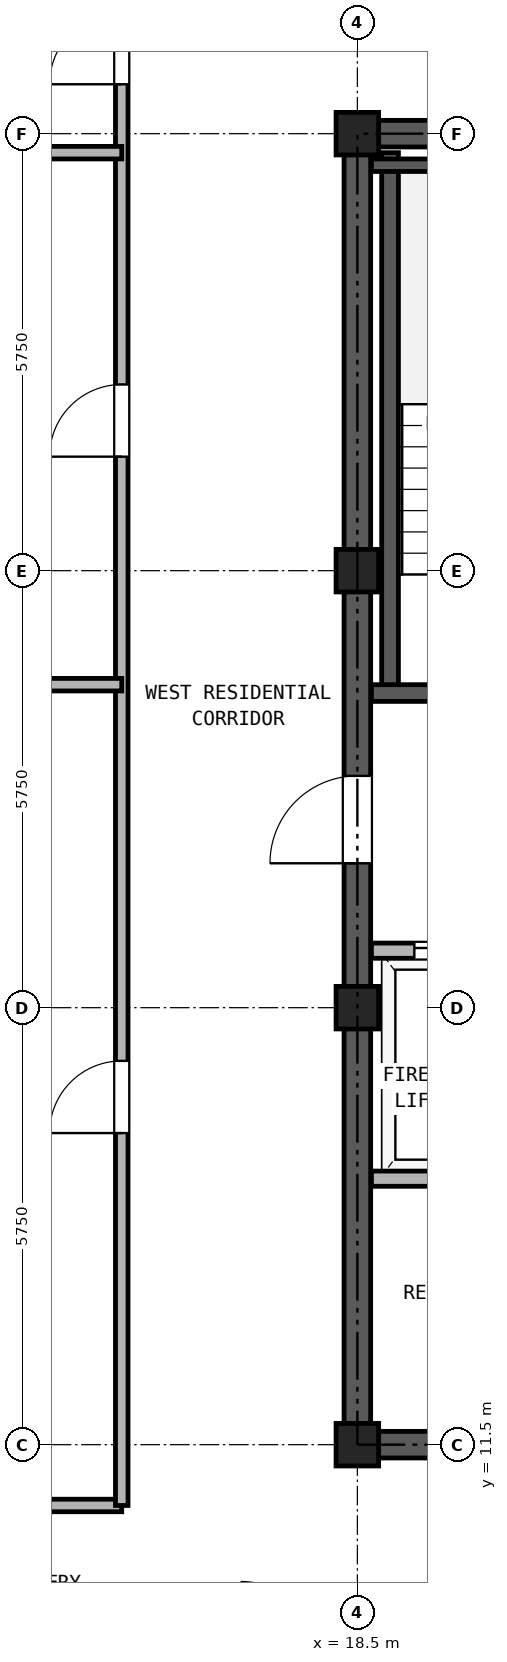
"""IFC4 building model, lengths in metres.
Left out: names, types, materials, properties, quantities, classifications, styles, units other than length and angle.
Written with IfcOpenShell. Run it as: python <this file> out.ifc"""

import sys

from ifc_helpers import new_model, si_unit, direction, frame, frame_2d, origin, origin_2d, place, context, subcontext, project, spatial, rectangle, hollow_rectangle, extrude, source, transform, mapped, element, fill, save


model = new_model("IFC4")
c1 = context("Model", 3, precision=1e-05, world=origin(), true_north=direction((0.0, 1.0)))
c2 = subcontext(c1, "Body", "Model", "MODEL_VIEW")
j1 = project(units=[si_unit("LENGTHUNIT", "METRE"), si_unit("PLANEANGLEUNIT", "RADIAN")], contexts=[c1])
p1 = place(None, origin())
s1 = spatial("IfcSite", under=j1, at=p1, CompositionType="ELEMENT")
p2 = place(p1, origin())
s2 = spatial("IfcBuilding", under=s1, at=p2, CompositionType="ELEMENT")
p3 = place(p2, frame((0.0, 0.0, 239.3)))
s3 = spatial("IfcBuildingStorey", under=s2, at=p3, CompositionType="ELEMENT", Elevation=239.3)
m1 = source(origin(), c2, "Body", "SweptSolid", [
    extrude(hollow_rectangle(XDim=0.56, YDim=0.56, WallThickness=0.03, at=origin_2d()), origin(), (0.0, 0.0, 1.0), 2.98),
])
for number, where, z_axis, x_axis in (
    (1, (18.5, 11.5, 0.0), (0.0, 0.0, 1.0), (1.0, 0.0, 0.0)),
    (2, (18.5, 17.25, 0.0), (0.0, 0.0, 1.0), (1.0, 0.0, 0.0)),
    (3, (18.5, 23.0, 0.0), (0.0, 0.0, 1.0), (1.0, 0.0, 0.0)),
    (4, (18.5, 28.75, 0.0), (0.0, 0.0, 1.0), (1.0, 0.0, 0.0)),
):
    element("IfcColumn", number, at=place(p3, frame(where, z_axis=z_axis, x_axis=x_axis)), inside=s3, PredefinedType="COLUMN", context=c2, shape_type="MappedRepresentation", body=[
        mapped(m1, transform((0.0, 0.0, 0.0), x_axis=(1.0, 0.0, 0.0), y_axis=(0.0, 1.0, 0.0), z_axis=(0.0, 0.0, 1.0), scale=1.0)),
    ])
p4 = place(p3, frame((18.325, 11.5, 0.0), z_axis=(0.0, 0.0, 1.0), x_axis=(1.0, 0.0, 0.0)))
e5 = element("IfcWall", 5, at=p4, inside=s3, PredefinedType="SHEAR", context=c2, shape_type="SweptSolid", body=[
    extrude(rectangle(XDim=10.35, YDim=0.35, at=frame_2d((5.175, 0.0))), origin(), (0.0, 0.0, 1.0), 2.98),
])
p5 = place(p4, frame((1.775, 0.0, 0.0)))
e6 = element("IfcOpeningElement", 6, at=p5, cuts=e5, PredefinedType="OPENING", context=c2, shape_type="SweptSolid", body=[
    extrude(rectangle(XDim=0.95, YDim=2.15, at=frame_2d((0.475, 1.075))), frame((0.0, 0.185, 0.0), z_axis=(0.0, -1.0, 0.0), x_axis=(1.0, 0.0, 0.0)), (0.0, 0.0, 1.0), 0.37),
])
p6 = place(p4, frame((5.275, 0.0, 0.0)))
e7 = element("IfcOpeningElement", 7, at=p6, cuts=e5, PredefinedType="OPENING", context=c2, shape_type="SweptSolid", body=[
    extrude(rectangle(XDim=0.95, YDim=2.15, at=frame_2d((0.475, 1.075))), frame((0.0, 0.185, 0.0), z_axis=(0.0, -1.0, 0.0), x_axis=(1.0, 0.0, 0.0)), (0.0, 0.0, 1.0), 0.37),
])
p7 = place(p4, frame((8.175, 0.0, 0.0)))
e8 = element("IfcOpeningElement", 8, at=p7, cuts=e5, PredefinedType="OPENING", context=c2, shape_type="SweptSolid", body=[
    extrude(rectangle(XDim=1.1, YDim=2.25, at=frame_2d((0.55, 1.125))), frame((0.0, 0.185, 0.0), z_axis=(0.0, -1.0, 0.0), x_axis=(1.0, 0.0, 0.0)), (0.0, 0.0, 1.0), 0.37),
])
p8 = place(p3, frame((18.325, 28.75, 0.0), z_axis=(0.0, 0.0, 1.0), x_axis=(1.0, 0.0, 0.0)))
e9 = element("IfcWall", 9, at=p8, inside=s3, PredefinedType="SHEAR", context=c2, shape_type="SweptSolid", body=[
    extrude(rectangle(XDim=10.35, YDim=0.35, at=frame_2d((5.175, 0.0))), origin(), (0.0, 0.0, 1.0), 2.98),
])
p9 = place(p8, frame((4.055, 0.0, 0.0)))
e10 = element("IfcOpeningElement", 10, at=p9, cuts=e9, PredefinedType="OPENING", context=c2, shape_type="SweptSolid", body=[
    extrude(rectangle(XDim=0.9, YDim=2.05, at=frame_2d((0.45, 1.025))), frame((0.0, 0.185, 0.0), z_axis=(0.0, -1.0, 0.0), x_axis=(1.0, 0.0, 0.0)), (0.0, 0.0, 1.0), 0.37),
])
p10 = place(p8, frame((5.595, 0.0, 0.0)))
e11 = element("IfcOpeningElement", 11, at=p10, cuts=e9, PredefinedType="OPENING", context=c2, shape_type="SweptSolid", body=[
    extrude(rectangle(XDim=0.9, YDim=2.05, at=frame_2d((0.45, 1.025))), frame((0.0, 0.185, 0.0), z_axis=(0.0, -1.0, 0.0), x_axis=(1.0, 0.0, 0.0)), (0.0, 0.0, 1.0), 0.37),
])
p11 = place(p3, frame((18.5, 11.675, 0.0), z_axis=(0.0, 0.0, 1.0), x_axis=(0.0, 1.0, 0.0)))
e12 = element("IfcWall", 12, at=p11, inside=s3, PredefinedType="SHEAR", context=c2, shape_type="SweptSolid", body=[
    extrude(rectangle(XDim=16.9, YDim=0.35, at=frame_2d((8.45, 0.0))), origin(), (0.0, 0.0, 1.0), 2.98),
])
p12 = place(p11, frame((7.475, 0.0, 0.0)))
e13 = element("IfcOpeningElement", 13, at=p12, cuts=e12, PredefinedType="OPENING", context=c2, shape_type="SweptSolid", body=[
    extrude(rectangle(XDim=1.15, YDim=2.2, at=frame_2d((0.575, 1.1))), frame((0.0, 0.185, 0.0), z_axis=(0.0, -1.0, 0.0), x_axis=(1.0, 0.0, 0.0)), (0.0, 0.0, 1.0), 0.37),
])
p13 = place(p3, frame((18.93, 21.39, 0.0), z_axis=(0.0, 0.0, 1.0), x_axis=(0.0, 1.0, 0.0)))
e14 = element("IfcWall", 14, at=p13, inside=s3, PredefinedType="SOLIDWALL", context=c2, shape_type="SweptSolid", body=[
    extrude(rectangle(XDim=7.11, YDim=0.22, at=frame_2d((3.555, 0.0))), origin(), (0.0, 0.0, 1.0), 2.98),
])
p14 = place(p3, frame((18.685, 28.335, 0.0), z_axis=(0.0, 0.0, 1.0), x_axis=(1.0, 0.0, 0.0)))
e15 = element("IfcWall", 15, at=p14, inside=s3, PredefinedType="PARTITIONING", context=c2, shape_type="SweptSolid", body=[
    extrude(rectangle(XDim=3.425, YDim=0.165, at=frame_2d((1.712, 0.0))), origin(), (0.0, 0.0, 1.0), 2.98),
])
p15 = place(p3, frame((18.685, 21.39, 0.0), z_axis=(0.0, 0.0, 1.0), x_axis=(1.0, 0.0, 0.0)))
e16 = element("IfcWall", 16, at=p15, inside=s3, PredefinedType="SOLIDWALL", context=c2, shape_type="SweptSolid", body=[
    extrude(rectangle(XDim=6.445, YDim=0.22, at=frame_2d((3.222, 0.0))), origin(), (0.0, 0.0, 1.0), 2.98),
])
p16 = place(p15, frame((1.165, 0.0, 0.0)))
e17 = element("IfcOpeningElement", 17, at=p16, cuts=e16, PredefinedType="OPENING", context=c2, shape_type="SweptSolid", body=[
    extrude(rectangle(XDim=1.15, YDim=2.2, at=frame_2d((0.575, 1.1))), frame((0.0, 0.12, 0.0), z_axis=(0.0, -1.0, 0.0), x_axis=(1.0, 0.0, 0.0)), (0.0, 0.0, 1.0), 0.24),
])
p17 = place(p15, frame((4.895, 0.0, 0.0)))
e18 = element("IfcOpeningElement", 18, at=p17, cuts=e16, PredefinedType="OPENING", context=c2, shape_type="SweptSolid", body=[
    extrude(rectangle(XDim=1.1, YDim=2.25, at=frame_2d((0.55, 1.125))), frame((0.0, 0.12, 0.0), z_axis=(0.0, -1.0, 0.0), x_axis=(1.0, 0.0, 0.0)), (0.0, 0.0, 1.0), 0.24),
])
p18 = place(p3, frame((18.685, 18.0, 0.0), z_axis=(0.0, 0.0, 1.0), x_axis=(1.0, 0.0, 0.0)))
e19 = element("IfcWall", 19, at=p18, inside=s3, PredefinedType="PARTITIONING", context=c2, shape_type="SweptSolid", body=[
    extrude(rectangle(XDim=9.63, YDim=0.2, at=frame_2d((4.815, 0.0))), origin(), (0.0, 0.0, 1.0), 2.98),
])
p19 = place(p18, frame((0.565, 0.0, 0.0)))
e20 = element("IfcOpeningElement", 20, at=p19, cuts=e19, PredefinedType="OPENING", context=c2, shape_type="SweptSolid", body=[
    extrude(rectangle(XDim=1.3, YDim=2.3, at=frame_2d((0.65, 1.15))), frame((0.0, 0.11, 0.0), z_axis=(0.0, -1.0, 0.0), x_axis=(1.0, 0.0, 0.0)), (0.0, 0.0, 1.0), 0.22),
])
p20 = place(p18, frame((2.665, 0.0, 0.0)))
e21 = element("IfcOpeningElement", 21, at=p20, cuts=e19, PredefinedType="OPENING", context=c2, shape_type="SweptSolid", body=[
    extrude(rectangle(XDim=1.3, YDim=2.3, at=frame_2d((0.65, 1.15))), frame((0.0, 0.11, 0.0), z_axis=(0.0, -1.0, 0.0), x_axis=(1.0, 0.0, 0.0)), (0.0, 0.0, 1.0), 0.22),
])
p21 = place(p18, frame((5.065, 0.0, 0.0)))
e22 = element("IfcOpeningElement", 22, at=p21, cuts=e19, PredefinedType="OPENING", context=c2, shape_type="SweptSolid", body=[
    extrude(rectangle(XDim=0.9, YDim=2.05, at=frame_2d((0.45, 1.025))), frame((0.0, 0.11, 0.0), z_axis=(0.0, -1.0, 0.0), x_axis=(1.0, 0.0, 0.0)), (0.0, 0.0, 1.0), 0.22),
])
p22 = place(p18, frame((7.765, 0.0, 0.0)))
e23 = element("IfcOpeningElement", 23, at=p22, cuts=e19, PredefinedType="OPENING", context=c2, shape_type="SweptSolid", body=[
    extrude(rectangle(XDim=0.9, YDim=2.05, at=frame_2d((0.45, 1.025))), frame((0.0, 0.11, 0.0), z_axis=(0.0, -1.0, 0.0), x_axis=(1.0, 0.0, 0.0)), (0.0, 0.0, 1.0), 0.22),
])
p23 = place(p3, frame((18.685, 15.0, 0.0), z_axis=(0.0, 0.0, 1.0), x_axis=(1.0, 0.0, 0.0)))
e24 = element("IfcWall", 24, at=p23, inside=s3, PredefinedType="PARTITIONING", context=c2, shape_type="SweptSolid", body=[
    extrude(rectangle(XDim=9.63, YDim=0.2, at=frame_2d((4.815, 0.0))), origin(), (0.0, 0.0, 1.0), 2.98),
])
p24 = place(p3, frame((8.56, 10.7, 0.0), z_axis=(0.0, 0.0, 1.0), x_axis=(1.0, 0.0, 0.0)))
e25 = element("IfcWall", 25, at=p24, inside=s3, PredefinedType="PARTITIONING", context=c2, shape_type="SweptSolid", body=[
    extrude(rectangle(XDim=6.84, YDim=0.165, at=frame_2d((3.42, 0.0))), origin(), (0.0, 0.0, 1.0), 2.98),
])
p25 = place(p3, frame((15.4, 10.7, 0.0), z_axis=(0.0, 0.0, 1.0), x_axis=(0.0, 1.0, 0.0)))
e26 = element("IfcWall", 26, at=p25, inside=s3, PredefinedType="PARTITIONING", context=c2, shape_type="SweptSolid", body=[
    extrude(rectangle(XDim=24.44, YDim=0.165, at=frame_2d((12.22, 0.0))), origin(), (0.0, 0.0, 1.0), 2.98),
])
p26 = place(p25, frame((4.9, 0.0, 0.0)))
e27 = element("IfcOpeningElement", 27, at=p26, cuts=e26, PredefinedType="OPENING", context=c2, shape_type="SweptSolid", body=[
    extrude(rectangle(XDim=0.95, YDim=2.15, at=frame_2d((0.475, 1.075))), frame((0.0, 0.093, 0.0), z_axis=(0.0, -1.0, 0.0), x_axis=(1.0, 0.0, 0.0)), (0.0, 0.0, 1.0), 0.185),
])
p27 = place(p25, frame((13.8, 0.0, 0.0)))
e28 = element("IfcOpeningElement", 28, at=p27, cuts=e26, PredefinedType="OPENING", context=c2, shape_type="SweptSolid", body=[
    extrude(rectangle(XDim=0.95, YDim=2.15, at=frame_2d((0.475, 1.075))), frame((0.0, 0.093, 0.0), z_axis=(0.0, -1.0, 0.0), x_axis=(1.0, 0.0, 0.0)), (0.0, 0.0, 1.0), 0.185),
])
p28 = place(p25, frame((18.7, 0.0, 0.0)))
e29 = element("IfcOpeningElement", 29, at=p28, cuts=e26, PredefinedType="OPENING", context=c2, shape_type="SweptSolid", body=[
    extrude(rectangle(XDim=0.95, YDim=2.15, at=frame_2d((0.475, 1.075))), frame((0.0, 0.093, 0.0), z_axis=(0.0, -1.0, 0.0), x_axis=(1.0, 0.0, 0.0)), (0.0, 0.0, 1.0), 0.185),
])
p29 = place(p3, frame((5.36, 21.5, 0.0), z_axis=(0.0, 0.0, 1.0), x_axis=(1.0, 0.0, 0.0)))
e30 = element("IfcWall", 30, at=p29, inside=s3, PredefinedType="PARTITIONING", context=c2, shape_type="SweptSolid", body=[
    extrude(rectangle(XDim=10.04, YDim=0.165, at=frame_2d((5.02, 0.0))), origin(), (0.0, 0.0, 1.0), 2.98),
])
p30 = place(p3, frame((5.36, 28.5, 0.0), z_axis=(0.0, 0.0, 1.0), x_axis=(1.0, 0.0, 0.0)))
e31 = element("IfcWall", 31, at=p30, inside=s3, PredefinedType="PARTITIONING", context=c2, shape_type="SweptSolid", body=[
    extrude(rectangle(XDim=10.04, YDim=0.165, at=frame_2d((5.02, 0.0))), origin(), (0.0, 0.0, 1.0), 2.428),
])
p31 = place(p19, origin())
e32 = element("IfcDoor", 32, at=p31, inside=s3, OperationType="DOUBLE_DOOR_SLIDING", PredefinedType="DOOR", context=c2, shape_type="SweptSolid", body=[
    extrude(rectangle(XDim=1.3, YDim=2.3, at=frame_2d((0.65, 1.15))), frame((0.0, 0.025, 0.0), z_axis=(0.0, -1.0, 0.0), x_axis=(1.0, 0.0, 0.0)), (0.0, 0.0, 1.0), 0.05),
])
fill(e20, e32)
p32 = place(p12, frame((1.15, 0.0, 0.0), z_axis=(0.0, 0.0, 1.0), x_axis=(-1.0, 0.0, 0.0)))
e33 = element("IfcDoor", 33, at=p32, inside=s3, OperationType="SINGLE_SWING_LEFT", PredefinedType="DOOR", context=c2, shape_type="SweptSolid", body=[
    extrude(rectangle(XDim=1.15, YDim=2.2, at=frame_2d((0.575, 1.1))), frame((0.0, 0.025, 0.0), z_axis=(0.0, -1.0, 0.0), x_axis=(1.0, 0.0, 0.0)), (0.0, 0.0, 1.0), 0.05),
])
fill(e13, e33)
p33 = place(p26, frame((0.95, 0.0, 0.0), z_axis=(0.0, 0.0, 1.0), x_axis=(-1.0, 0.0, 0.0)))
e34 = element("IfcDoor", 34, at=p33, inside=s3, OperationType="SINGLE_SWING_LEFT", PredefinedType="DOOR", context=c2, shape_type="SweptSolid", body=[
    extrude(rectangle(XDim=0.95, YDim=2.15, at=frame_2d((0.475, 1.075))), frame((0.0, 0.025, 0.0), z_axis=(0.0, -1.0, 0.0), x_axis=(1.0, 0.0, 0.0)), (0.0, 0.0, 1.0), 0.05),
])
fill(e27, e34)
p34 = place(p27, frame((0.95, 0.0, 0.0), z_axis=(0.0, 0.0, 1.0), x_axis=(-1.0, 0.0, 0.0)))
e35 = element("IfcDoor", 35, at=p34, inside=s3, OperationType="SINGLE_SWING_LEFT", PredefinedType="DOOR", context=c2, shape_type="SweptSolid", body=[
    extrude(rectangle(XDim=0.95, YDim=2.15, at=frame_2d((0.475, 1.075))), frame((0.0, 0.025, 0.0), z_axis=(0.0, -1.0, 0.0), x_axis=(1.0, 0.0, 0.0)), (0.0, 0.0, 1.0), 0.05),
])
fill(e28, e35)
p35 = place(p28, frame((0.95, 0.0, 0.0), z_axis=(0.0, 0.0, 1.0), x_axis=(-1.0, 0.0, 0.0)))
e36 = element("IfcDoor", 36, at=p35, inside=s3, OperationType="SINGLE_SWING_LEFT", PredefinedType="DOOR", context=c2, shape_type="SweptSolid", body=[
    extrude(rectangle(XDim=0.95, YDim=2.15, at=frame_2d((0.475, 1.075))), frame((0.0, 0.025, 0.0), z_axis=(0.0, -1.0, 0.0), x_axis=(1.0, 0.0, 0.0)), (0.0, 0.0, 1.0), 0.05),
])
fill(e29, e36)
save(model, sys.argv[1])
